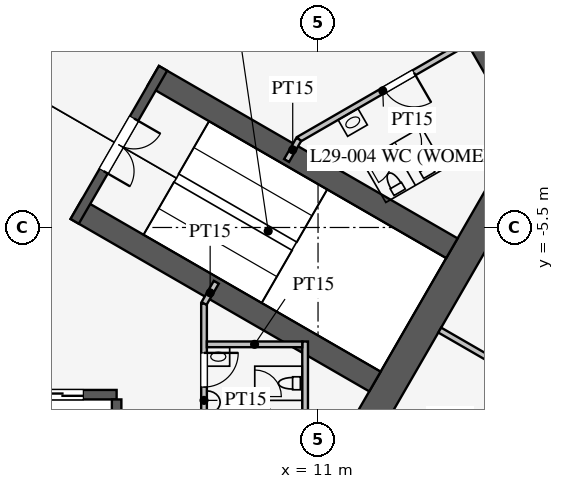
"""IFC4 building model, lengths in metres.
Left out: names, types, materials, properties, quantities, classifications, styles, units other than length and angle.
Written with IfcOpenShell. Run it as: python <this file> out.ifc"""

import sys

from ifc_helpers import new_model, si_unit, direction, frame, frame_2d, origin, place, context, subcontext, project, spatial, rectangle, extrude, element, fill, save


model = new_model("IFC4")
c1 = context("Model", 3, precision=1e-05, world=origin(), true_north=direction((0.0, 1.0)))
c2 = subcontext(c1, "Body", "Model", "MODEL_VIEW")
j1 = project(units=[si_unit("LENGTHUNIT", "METRE"), si_unit("PLANEANGLEUNIT", "RADIAN")], contexts=[c1])
p1 = place(None, origin())
s1 = spatial("IfcSite", under=j1, at=p1, CompositionType="ELEMENT")
p2 = place(p1, origin())
s2 = spatial("IfcBuilding", under=s1, at=p2, CompositionType="ELEMENT")
p3 = place(p2, frame((0.0, 0.0, 128.3)))
s3 = spatial("IfcBuildingStorey", under=s2, at=p3, CompositionType="ELEMENT", Elevation=128.3)
p4 = place(p3, frame((10.97, -13.0, 0.0), z_axis=(0.0, 0.0, 1.0), x_axis=(0.499995765644, 0.866027848477, 0.0)))
e1 = element("IfcWall", 1, at=p4, inside=s3, PredefinedType="SHEAR", context=c2, shape_type="SweptSolid", body=[
    extrude(rectangle(XDim=11.547, YDim=0.8, at=frame_2d((5.773, 0.0))), origin(), (0.0, 0.0, 1.0), 4.2),
])
p5 = place(p3, frame((16.743, -3.0, 0.0), z_axis=(0.0, 0.0, 1.0), x_axis=(-0.500002442456, 0.866023993627, 0.0)))
e2 = element("IfcWall", 2, at=p5, inside=s3, PredefinedType="SHEAR", context=c2, shape_type="SweptSolid", body=[
    extrude(rectangle(XDim=21.939, YDim=0.8, at=frame_2d((10.97, 0.0))), origin(), (0.0, 0.0, 1.0), 4.2),
])
p6 = place(p5, frame((17.27, 0.0, 0.0)))
e3 = element("IfcOpeningElement", 3, at=p6, cuts=e2, PredefinedType="OPENING", context=c2, shape_type="SweptSolid", body=[
    extrude(rectangle(XDim=1.2, YDim=2.1, at=frame_2d((0.6, 1.05))), frame((0.0, 0.41, 0.0), z_axis=(0.0, -1.0, 0.0), x_axis=(1.0, 0.0, 0.0)), (0.0, 0.0, 1.0), 0.82),
])
p7 = place(p5, frame((3.47, 0.0, 0.0)))
e4 = element("IfcOpeningElement", 4, at=p7, cuts=e2, PredefinedType="OPENING", context=c2, shape_type="SweptSolid", body=[
    extrude(rectangle(XDim=1.2, YDim=2.1, at=frame_2d((0.6, 1.05))), frame((0.0, 0.41, 0.0), z_axis=(0.0, -1.0, 0.0), x_axis=(1.0, 0.0, 0.0)), (0.0, 0.0, 1.0), 0.82),
])
p8 = place(p3, frame((-5.7, -9.9, 0.0), z_axis=(0.0, 0.0, 1.0), x_axis=(1.0, 0.0, 0.0)))
e5 = element("IfcWall", 5, at=p8, inside=s3, PredefinedType="SHEAR", context=c2, shape_type="SweptSolid", body=[
    extrude(rectangle(XDim=11.4, YDim=0.25, at=frame_2d((5.7, 0.0))), origin(), (0.0, 0.0, 1.0), 4.2),
])
p9 = place(p8, frame((0.875, 0.0, 0.0)))
e6 = element("IfcOpeningElement", 6, at=p9, cuts=e5, PredefinedType="OPENING", context=c2, shape_type="SweptSolid", body=[
    extrude(rectangle(XDim=1.1, YDim=2.2, at=frame_2d((0.55, 1.1))), frame((0.0, 0.135, 0.0), z_axis=(0.0, -1.0, 0.0), x_axis=(1.0, 0.0, 0.0)), (0.0, 0.0, 1.0), 0.27),
])
p10 = place(p8, frame((3.725, 0.0, 0.0)))
e7 = element("IfcOpeningElement", 7, at=p10, cuts=e5, PredefinedType="OPENING", context=c2, shape_type="SweptSolid", body=[
    extrude(rectangle(XDim=1.1, YDim=2.2, at=frame_2d((0.55, 1.1))), frame((0.0, 0.135, 0.0), z_axis=(0.0, -1.0, 0.0), x_axis=(1.0, 0.0, 0.0)), (0.0, 0.0, 1.0), 0.27),
])
p11 = place(p8, frame((6.575, 0.0, 0.0)))
e8 = element("IfcOpeningElement", 8, at=p11, cuts=e5, PredefinedType="OPENING", context=c2, shape_type="SweptSolid", body=[
    extrude(rectangle(XDim=1.1, YDim=2.2, at=frame_2d((0.55, 1.1))), frame((0.0, 0.135, 0.0), z_axis=(0.0, -1.0, 0.0), x_axis=(1.0, 0.0, 0.0)), (0.0, 0.0, 1.0), 0.27),
])
p12 = place(p8, frame((9.425, 0.0, 0.0)))
e9 = element("IfcOpeningElement", 9, at=p12, cuts=e5, PredefinedType="OPENING", context=c2, shape_type="SweptSolid", body=[
    extrude(rectangle(XDim=1.1, YDim=2.2, at=frame_2d((0.55, 1.1))), frame((0.0, 0.135, 0.0), z_axis=(0.0, -1.0, 0.0), x_axis=(1.0, 0.0, 0.0)), (0.0, 0.0, 1.0), 0.27),
])
p13 = place(p3, frame((5.7, -10.025, 0.0), z_axis=(0.0, 0.0, 1.0), x_axis=(0.0, -1.0, 0.0)))
e10 = element("IfcWall", 10, at=p13, inside=s3, PredefinedType="SHEAR", context=c2, shape_type="SweptSolid", body=[
    extrude(rectangle(XDim=2.575, YDim=0.25, at=frame_2d((1.288, 0.0))), origin(), (0.0, 0.0, 1.0), 4.2),
])
for number, where, z_axis, x_axis in (
    (11, (4.638, -5.016, 0.0), (0.0, 0.0, 1.0), (0.866, -0.5, 0.0)),
    (12, (6.663, -1.509, 0.0), (0.0, 0.0, 1.0), (0.866, -0.5, 0.0)),
):
    element("IfcWall", number, at=place(p3, frame(where, z_axis=z_axis, x_axis=x_axis)), inside=s3, PredefinedType="SHEAR", context=c2, shape_type="SweptSolid", body=[
        extrude(rectangle(XDim=9.075, YDim=0.6, at=frame_2d((4.538, 0.0))), origin(), (0.0, 0.0, 1.0), 4.2),
    ])
p14 = place(p3, frame((4.597, -5.339, 0.0), z_axis=(0.0, 0.0, 1.0), x_axis=(0.499984536904, 0.866034331223, 0.0)))
e13 = element("IfcWall", 13, at=p14, inside=s3, PredefinedType="SHEAR", context=c2, shape_type="SweptSolid", body=[
    extrude(rectangle(XDim=4.65, YDim=0.25, at=frame_2d((2.325, 0.0))), origin(), (0.0, 0.0, 1.0), 4.2),
])
p15 = place(p14, frame((1.525, 0.0, 0.0)))
e14 = element("IfcOpeningElement", 14, at=p15, cuts=e13, PredefinedType="OPENING", context=c2, shape_type="SweptSolid", body=[
    extrude(rectangle(XDim=1.6, YDim=2.1, at=frame_2d((0.8, 1.05))), frame((0.0, 0.135, 0.0), z_axis=(0.0, -1.0, 0.0), x_axis=(1.0, 0.0, 0.0)), (0.0, 0.0, 1.0), 0.27),
])
p16 = place(p3, frame((8.0, -7.5, 0.0), z_axis=(0.0, 0.0, 1.0), x_axis=(0.0, -1.0, 0.0)))
e15 = element("IfcWall", 15, at=p16, inside=s3, PredefinedType="PARTITIONING", context=c2, shape_type="SweptSolid", body=[
    extrude(rectangle(XDim=5.1, YDim=0.15, at=frame_2d((2.55, 0.0))), origin(), (0.0, 0.0, 1.0), 4.0),
])
p17 = place(p16, frame((1.3, 0.0, 0.0)))
e16 = element("IfcOpeningElement", 16, at=p17, cuts=e15, PredefinedType="OPENING", context=c2, shape_type="SweptSolid", body=[
    extrude(rectangle(XDim=0.9, YDim=2.1, at=frame_2d((0.45, 1.05))), frame((0.0, 0.085, 0.0), z_axis=(0.0, -1.0, 0.0), x_axis=(1.0, 0.0, 0.0)), (0.0, 0.0, 1.0), 0.17),
])
p18 = place(p3, frame((10.495, -3.178, 0.0), z_axis=(0.0, 0.0, 1.0), x_axis=(0.86602216432, 0.500005610874, 0.0)))
e17 = element("IfcWall", 17, at=p18, inside=s3, PredefinedType="PARTITIONING", context=c2, shape_type="SweptSolid", body=[
    extrude(rectangle(XDim=5.1, YDim=0.15, at=frame_2d((2.55, 0.0))), origin(), (0.0, 0.0, 1.0), 4.0),
])
p19 = place(p18, frame((2.6, 0.0, 0.0)))
e18 = element("IfcOpeningElement", 18, at=p19, cuts=e17, PredefinedType="OPENING", context=c2, shape_type="SweptSolid", body=[
    extrude(rectangle(XDim=0.9, YDim=2.1, at=frame_2d((0.45, 1.05))), frame((0.0, 0.085, 0.0), z_axis=(0.0, -1.0, 0.0), x_axis=(1.0, 0.0, 0.0)), (0.0, 0.0, 1.0), 0.17),
])
for number, where, z_axis, x_axis in (
    (19, (8.0, -7.5, 0.0), (0.0, 0.0, 1.0), (0.5, 0.866, 0.0)),
    (20, (10.495, -3.178, 0.0), (0.0, 0.0, 1.0), (-0.5, -0.866, 0.0)),
):
    element("IfcWall", number, at=place(p3, frame(where, z_axis=z_axis, x_axis=x_axis)), inside=s3, PredefinedType="PARTITIONING", context=c2, shape_type="SweptSolid", body=[
        extrude(rectangle(XDim=0.645, YDim=0.15, at=frame_2d((0.323, 0.0))), origin(), (0.0, 0.0, 1.0), 4.0),
    ])
p20 = place(p3, frame((10.66, -8.5, 0.0), z_axis=(0.0, 0.0, 1.0), x_axis=(0.0, -1.0, 0.0)))
e21 = element("IfcWall", 21, at=p20, inside=s3, PredefinedType="PARTITIONING", context=c2, shape_type="SweptSolid", body=[
    extrude(rectangle(XDim=4.1, YDim=0.15, at=frame_2d((2.05, 0.0))), origin(), (0.0, 0.0, 1.0), 4.0),
])
p21 = place(p3, frame((8.075, -8.575, 0.0), z_axis=(0.0, 0.0, 1.0), x_axis=(1.0, 0.0, 0.0)))
e22 = element("IfcWall", 22, at=p21, inside=s3, PredefinedType="PARTITIONING", context=c2, shape_type="SweptSolid", body=[
    extrude(rectangle(XDim=2.51, YDim=0.15, at=frame_2d((1.255, 0.0))), origin(), (0.0, 0.0, 1.0), 4.0),
])
p22 = place(p3, frame((14.203, -8.2, 0.0), z_axis=(0.0, 0.0, 1.0), x_axis=(0.866024668836, -0.500001272966, 0.0)))
e23 = element("IfcWall", 23, at=p22, inside=s3, PredefinedType="PARTITIONING", context=c2, shape_type="SweptSolid", body=[
    extrude(rectangle(XDim=16.65, YDim=0.15, at=frame_2d((8.325, 0.0))), origin(), (0.0, 0.0, 1.0), 2.3),
])
p23 = place(p3, frame((26.415, -15.231, 0.0), z_axis=(0.0, 0.0, 1.0), x_axis=(-0.50000091641, 0.866024874695, 0.0)))
e24 = element("IfcWall", 24, at=p23, inside=s3, PredefinedType="PARTITIONING", context=c2, shape_type="SweptSolid", body=[
    extrude(rectangle(XDim=52.796, YDim=0.12, at=frame_2d((26.398, 0.0))), origin(), (0.0, 0.0, 1.0), 2.9),
])
p24 = place(p23, frame((10.2, 0.0, 0.15)))
e25 = element("IfcOpeningElement", 25, at=p24, cuts=e24, PredefinedType="OPENING", context=c2, shape_type="SweptSolid", body=[
    extrude(rectangle(XDim=1.8, YDim=2.1, at=frame_2d((0.9, 1.05))), frame((0.0, 0.07, 0.0), z_axis=(0.0, -1.0, 0.0), x_axis=(1.0, 0.0, 0.0)), (0.0, 0.0, 1.0), 0.14),
])
p25 = place(p23, frame((40.8, 0.0, 0.15)))
e26 = element("IfcOpeningElement", 26, at=p25, cuts=e24, PredefinedType="OPENING", context=c2, shape_type="SweptSolid", body=[
    extrude(rectangle(XDim=1.8, YDim=2.1, at=frame_2d((0.9, 1.05))), frame((0.0, 0.07, 0.0), z_axis=(0.0, -1.0, 0.0), x_axis=(1.0, 0.0, 0.0)), (0.0, 0.0, 1.0), 0.14),
])
p26 = place(p17, origin())
e27 = element("IfcDoor", 27, at=p26, inside=s3, OperationType="SINGLE_SWING_LEFT", PredefinedType="DOOR", context=c2, shape_type="SweptSolid", body=[
    extrude(rectangle(XDim=0.9, YDim=2.1, at=frame_2d((0.45, 1.05))), frame((0.0, 0.025, 0.0), z_axis=(0.0, -1.0, 0.0), x_axis=(1.0, 0.0, 0.0)), (0.0, 0.0, 1.0), 0.05),
])
fill(e16, e27)
p27 = place(p19, frame((0.9, 0.0, 0.0), z_axis=(0.0, 0.0, 1.0), x_axis=(-1.0, 0.0, 0.0)))
e28 = element("IfcDoor", 28, at=p27, inside=s3, OperationType="SINGLE_SWING_LEFT", PredefinedType="DOOR", context=c2, shape_type="SweptSolid", body=[
    extrude(rectangle(XDim=0.9, YDim=2.1, at=frame_2d((0.45, 1.05))), frame((0.0, 0.025, 0.0), z_axis=(0.0, -1.0, 0.0), x_axis=(1.0, 0.0, 0.0)), (0.0, 0.0, 1.0), 0.05),
])
fill(e18, e28)
p28 = place(p15, frame((1.6, 0.0, 0.0), z_axis=(0.0, 0.0, 1.0), x_axis=(-1.0, 0.0, 0.0)))
e29 = element("IfcDoor", 29, at=p28, inside=s3, OperationType="DOUBLE_DOOR_SINGLE_SWING", PredefinedType="DOOR", context=c2, shape_type="SweptSolid", body=[
    extrude(rectangle(XDim=1.6, YDim=2.1, at=frame_2d((0.8, 1.05))), frame((0.0, 0.025, 0.0), z_axis=(0.0, -1.0, 0.0), x_axis=(1.0, 0.0, 0.0)), (0.0, 0.0, 1.0), 0.05),
])
fill(e14, e29)
p29 = place(p12, origin())
e30 = element("IfcDoor", 30, at=p29, inside=s3, OperationType="DOUBLE_DOOR_SLIDING", PredefinedType="DOOR", context=c2, shape_type="SweptSolid", body=[
    extrude(rectangle(XDim=1.1, YDim=2.2, at=frame_2d((0.55, 1.1))), frame((0.0, 0.025, 0.0), z_axis=(0.0, -1.0, 0.0), x_axis=(1.0, 0.0, 0.0)), (0.0, 0.0, 1.0), 0.05),
])
fill(e9, e30)
save(model, sys.argv[1])
